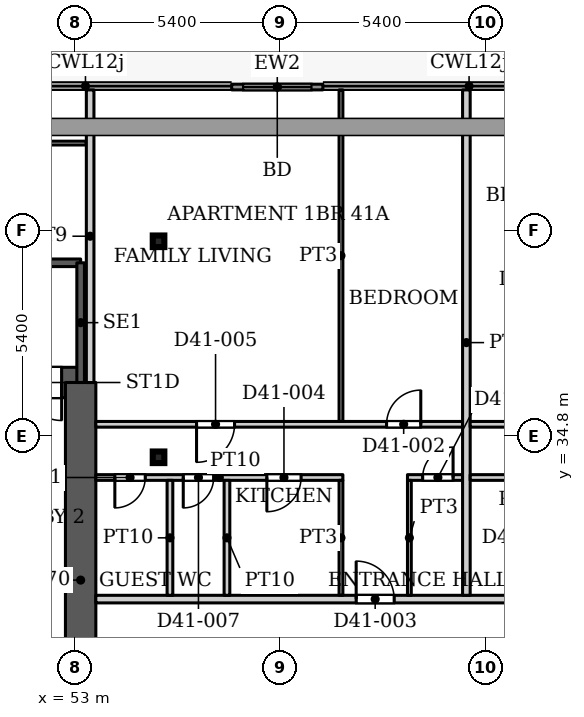
"""IFC4 building model, lengths in metres.
Left out: names, types, materials, properties, quantities, classifications, styles, units other than length and angle.
Written with IfcOpenShell. Run it as: python <this file> out.ifc"""

import sys

from ifc_helpers import new_model, si_unit, direction, frame, frame_2d, origin, origin_2d, place, context, subcontext, project, spatial, rectangle, hollow_rectangle, extrude, source, transform, mapped, element, fill, save


model = new_model("IFC4")
c1 = context("Model", 3, precision=1e-05, world=origin(), true_north=direction((0.0, 1.0)))
c2 = subcontext(c1, "Body", "Model", "MODEL_VIEW")
j1 = project(units=[si_unit("LENGTHUNIT", "METRE"), si_unit("PLANEANGLEUNIT", "RADIAN")], contexts=[c1])
p1 = place(None, origin())
s1 = spatial("IfcSite", under=j1, at=p1, CompositionType="ELEMENT")
p2 = place(p1, origin())
s2 = spatial("IfcBuilding", under=s1, at=p2, CompositionType="ELEMENT")
p3 = place(p2, frame((0.0, 0.0, 176.0)))
s3 = spatial("IfcBuildingStorey", under=s2, at=p3, CompositionType="ELEMENT", Elevation=176.0)
for number, where, z_axis, x_axis in (
    (1, (55.2, 34.232, 0.0), (0.0, 0.0, 1.0), (1.0, 0.0, 0.0)),
    (2, (55.2, 39.916, 0.0), (0.0, 0.0, 1.0), (1.0, 0.0, 0.0)),
):
    element("IfcColumn", number, at=place(p3, frame(where, z_axis=z_axis, x_axis=x_axis)), inside=s3, PredefinedType="COLUMN", context=c2, shape_type="SweptSolid", body=[
        extrude(hollow_rectangle(XDim=0.305, YDim=0.305, WallThickness=0.016, InnerFilletRadius=0.016, OuterFilletRadius=0.032, at=origin_2d()), origin(), (0.0, 0.0, 1.0), 3.9),
    ])
p4 = place(p3, frame((34.75, 36.2, 0.0), z_axis=(0.0, 0.0, 1.0), x_axis=(1.0, 0.0, 0.0)))
e3 = element("IfcWall", 3, at=p4, inside=s3, PredefinedType="SHEAR", context=c2, shape_type="SweptSolid", body=[
    extrude(rectangle(XDim=18.4, YDim=0.8, at=frame_2d((9.2, 0.0))), origin(), (0.0, 0.0, 1.0), 3.9),
])
p5 = place(p4, frame((16.9, 0.0, 0.0)))
e4 = element("IfcOpeningElement", 4, at=p5, cuts=e3, PredefinedType="OPENING", context=c2, shape_type="SweptSolid", body=[
    extrude(rectangle(XDim=1.0, YDim=2.2, at=frame_2d((0.5, 1.1))), frame((0.0, 0.41, 0.0), z_axis=(0.0, -1.0, 0.0), x_axis=(1.0, 0.0, 0.0)), (0.0, 0.0, 1.0), 0.82),
])
p6 = place(p3, frame((53.15, 25.8, 0.0), z_axis=(0.0, 0.0, 1.0), x_axis=(0.0, 1.0, 0.0)))
e5 = element("IfcWall", 5, at=p6, inside=s3, PredefinedType="SHEAR", context=c2, shape_type="SweptSolid", body=[
    extrude(rectangle(XDim=10.4, YDim=0.8, at=frame_2d((5.2, 0.0))), origin(), (0.0, 0.0, 1.0), 3.9),
])
p7 = place(p3, frame((57.124, 43.975, 0.0), z_axis=(0.0, 0.0, 1.0), x_axis=(1.0, 0.0, 0.0)))
e6 = element("IfcWall", 6, at=p7, inside=s3, PredefinedType="SOLIDWALL", context=c2, shape_type="SweptSolid", body=[
    extrude(rectangle(XDim=2.4, YDim=0.15, at=frame_2d((1.2, 0.0))), origin(), (0.0, 0.0, 1.0), 3.75),
])
p8 = place(p7, frame((0.3, 0.0, 0.0)))
e7 = element("IfcOpeningElement", 7, at=p8, cuts=e6, PredefinedType="OPENING", context=c2, shape_type="SweptSolid", body=[
    extrude(rectangle(XDim=1.8, YDim=2.4, at=frame_2d((0.9, 1.2))), frame((0.0, 0.085, 0.0), z_axis=(0.0, -1.0, 0.0), x_axis=(1.0, 0.0, 0.0)), (0.0, 0.0, 1.0), 0.17),
])
p9 = place(p3, frame((43.99, 39.35, 0.0), z_axis=(0.0, 0.0, 1.0), x_axis=(1.0, 0.0, 0.0)))
e8 = element("IfcWall", 8, at=p9, inside=s3, PredefinedType="SHEAR", context=c2, shape_type="SweptSolid", body=[
    extrude(rectangle(XDim=9.16, YDim=0.2, at=frame_2d((4.58, 0.0))), origin(), (0.0, 0.0, 1.0), 3.9),
])
p10 = place(p3, frame((53.15, 36.2, 0.0), z_axis=(0.0, 0.0, 1.0), x_axis=(0.0, 1.0, 0.0)))
e9 = element("IfcWall", 9, at=p10, inside=s3, PredefinedType="SHEAR", context=c2, shape_type="SweptSolid", body=[
    extrude(rectangle(XDim=3.15, YDim=0.2, at=frame_2d((1.575, 0.0))), origin(), (0.0, 0.0, 1.0), 3.9),
])
p11 = place(p3, frame((38.399, 42.5, 0.0), z_axis=(0.0, 0.0, 1.0), x_axis=(1.0, 0.0, 0.0)))
e10 = element("IfcWall", 10, at=p11, inside=s3, PredefinedType="PARTITIONING", context=c2, shape_type="SweptSolid", body=[
    extrude(rectangle(XDim=14.901, YDim=0.1, at=frame_2d((7.451, 0.0))), origin(), (0.0, 0.0, 1.0), 3.6),
])
p12 = place(p11, frame((6.801, 0.0, 0.0)))
e11 = element("IfcOpeningElement", 11, at=p12, cuts=e10, PredefinedType="OPENING", context=c2, shape_type="SweptSolid", body=[
    extrude(rectangle(XDim=1.0, YDim=2.1, at=frame_2d((0.5, 1.05))), frame((0.0, 0.06, 0.0), z_axis=(0.0, -1.0, 0.0), x_axis=(1.0, 0.0, 0.0)), (0.0, 0.0, 1.0), 0.12),
])
p13 = place(p3, frame((53.4, 36.199, 0.0), z_axis=(0.0, 0.0, 1.0), x_axis=(0.0, 1.0, 0.0)))
e12 = element("IfcWall", 12, at=p13, inside=s3, PredefinedType="PARTITIONING", context=c2, shape_type="SweptSolid", body=[
    extrude(rectangle(XDim=7.701, YDim=0.2, at=frame_2d((3.851, 0.0))), origin(), (0.0, 0.0, 1.0), 3.6),
])
p14 = place(p3, frame((53.549, 30.5, 0.0), z_axis=(0.0, 0.0, 1.0), x_axis=(1.0, 0.0, 0.0)))
e13 = element("IfcWall", 13, at=p14, inside=s3, PredefinedType="PARTITIONING", context=c2, shape_type="SweptSolid", body=[
    extrude(rectangle(XDim=44.551, YDim=0.2, at=frame_2d((22.275, 0.0))), origin(), (0.0, 0.0, 1.0), 3.6),
])
p15 = place(p14, frame((6.851, 0.0, 0.0)))
e14 = element("IfcOpeningElement", 14, at=p15, cuts=e13, PredefinedType="OPENING", context=c2, shape_type="SweptSolid", body=[
    extrude(rectangle(XDim=1.0, YDim=2.1, at=frame_2d((0.5, 1.05))), frame((0.0, 0.11, 0.0), z_axis=(0.0, -1.0, 0.0), x_axis=(1.0, 0.0, 0.0)), (0.0, 0.0, 1.0), 0.22),
])
p16 = place(p14, frame((13.451, 0.0, 0.0)))
e15 = element("IfcOpeningElement", 15, at=p16, cuts=e13, PredefinedType="OPENING", context=c2, shape_type="SweptSolid", body=[
    extrude(rectangle(XDim=1.0, YDim=2.1, at=frame_2d((0.5, 1.05))), frame((0.0, 0.11, 0.0), z_axis=(0.0, -1.0, 0.0), x_axis=(1.0, 0.0, 0.0)), (0.0, 0.0, 1.0), 0.22),
])
p17 = place(p14, frame((24.701, 0.0, 0.0)))
e16 = element("IfcOpeningElement", 16, at=p17, cuts=e13, PredefinedType="OPENING", context=c2, shape_type="SweptSolid", body=[
    extrude(rectangle(XDim=1.0, YDim=2.1, at=frame_2d((0.5, 1.05))), frame((0.0, 0.11, 0.0), z_axis=(0.0, -1.0, 0.0), x_axis=(1.0, 0.0, 0.0)), (0.0, 0.0, 1.0), 0.22),
])
p18 = place(p14, frame((38.651, 0.0, 0.0)))
e17 = element("IfcOpeningElement", 17, at=p18, cuts=e13, PredefinedType="OPENING", context=c2, shape_type="SweptSolid", body=[
    extrude(rectangle(XDim=1.0, YDim=2.1, at=frame_2d((0.5, 1.05))), frame((0.0, 0.11, 0.0), z_axis=(0.0, -1.0, 0.0), x_axis=(1.0, 0.0, 0.0)), (0.0, 0.0, 1.0), 0.22),
])
p19 = place(p3, frame((53.549, 33.7, 0.0), z_axis=(0.0, 0.0, 1.0), x_axis=(1.0, 0.0, 0.0)))
e18 = element("IfcWall", 18, at=p19, inside=s3, PredefinedType="PARTITIONING", context=c2, shape_type="SweptSolid", body=[
    extrude(rectangle(XDim=6.501, YDim=0.15, at=frame_2d((3.25, 0.0))), origin(), (0.0, 0.0, 1.0), 3.6),
])
p20 = place(p19, frame((0.501, 0.0, 0.0)))
e19 = element("IfcOpeningElement", 19, at=p20, cuts=e18, PredefinedType="OPENING", context=c2, shape_type="SweptSolid", body=[
    extrude(rectangle(XDim=0.8, YDim=2.1, at=frame_2d((0.4, 1.05))), frame((0.0, 0.085, 0.0), z_axis=(0.0, -1.0, 0.0), x_axis=(1.0, 0.0, 0.0)), (0.0, 0.0, 1.0), 0.17),
])
p21 = place(p19, frame((4.501, 0.0, 0.0)))
e20 = element("IfcOpeningElement", 20, at=p21, cuts=e18, PredefinedType="OPENING", context=c2, shape_type="SweptSolid", body=[
    extrude(rectangle(XDim=0.9, YDim=2.1, at=frame_2d((0.45, 1.05))), frame((0.0, 0.085, 0.0), z_axis=(0.0, -1.0, 0.0), x_axis=(1.0, 0.0, 0.0)), (0.0, 0.0, 1.0), 0.17),
])
p22 = place(p19, frame((2.301, 0.0, 0.0)))
e21 = element("IfcOpeningElement", 21, at=p22, cuts=e18, PredefinedType="OPENING", context=c2, shape_type="SweptSolid", body=[
    extrude(rectangle(XDim=0.8, YDim=2.1, at=frame_2d((0.4, 1.05))), frame((0.0, 0.085, 0.0), z_axis=(0.0, -1.0, 0.0), x_axis=(1.0, 0.0, 0.0)), (0.0, 0.0, 1.0), 0.17),
])
p23 = place(p3, frame((53.549, 35.1, 0.0), z_axis=(0.0, 0.0, 1.0), x_axis=(1.0, 0.0, 0.0)))
e22 = element("IfcWall", 22, at=p23, inside=s3, PredefinedType="PARTITIONING", context=c2, shape_type="SweptSolid", body=[
    extrude(rectangle(XDim=9.651, YDim=0.15, at=frame_2d((4.825, 0.0))), origin(), (0.0, 0.0, 1.0), 3.6),
])
p24 = place(p23, frame((7.651, 0.0, 0.0)))
e23 = element("IfcOpeningElement", 23, at=p24, cuts=e22, PredefinedType="OPENING", context=c2, shape_type="SweptSolid", body=[
    extrude(rectangle(XDim=0.9, YDim=2.1, at=frame_2d((0.45, 1.05))), frame((0.0, 0.085, 0.0), z_axis=(0.0, -1.0, 0.0), x_axis=(1.0, 0.0, 0.0)), (0.0, 0.0, 1.0), 0.17),
])
p25 = place(p23, frame((2.651, 0.0, 0.0)))
e24 = element("IfcOpeningElement", 24, at=p25, cuts=e22, PredefinedType="OPENING", context=c2, shape_type="SweptSolid", body=[
    extrude(rectangle(XDim=1.0, YDim=2.1, at=frame_2d((0.5, 1.05))), frame((0.0, 0.085, 0.0), z_axis=(0.0, -1.0, 0.0), x_axis=(1.0, 0.0, 0.0)), (0.0, 0.0, 1.0), 0.17),
])
for number, where, z_axis, x_axis in (
    (25, (55.5, 30.6, 0.0), (0.0, 0.0, 1.0), (0.0, 1.0, 0.0)),
    (26, (57.0, 30.6, 0.0), (0.0, 0.0, 1.0), (0.0, 1.0, 0.0)),
):
    element("IfcWall", number, at=place(p3, frame(where, z_axis=z_axis, x_axis=x_axis)), inside=s3, PredefinedType="PARTITIONING", context=c2, shape_type="SweptSolid", body=[
        extrude(rectangle(XDim=3.025, YDim=0.15, at=frame_2d((1.512, 0.0))), origin(), (0.0, 0.0, 1.0), 3.6),
    ])
p26 = place(p3, frame((60.0, 30.6, 0.0), z_axis=(0.0, 0.0, 1.0), x_axis=(0.0, 1.0, 0.0)))
e27 = element("IfcWall", 27, at=p26, inside=s3, PredefinedType="PARTITIONING", context=c2, shape_type="SweptSolid", body=[
    extrude(rectangle(XDim=3.025, YDim=0.1, at=frame_2d((1.512, 0.0))), origin(), (0.0, 0.0, 1.0), 3.6),
])
p27 = place(p3, frame((60.0, 35.175, 0.0), z_axis=(0.0, 0.0, 1.0), x_axis=(0.0, 1.0, 0.0)))
e28 = element("IfcWall", 28, at=p27, inside=s3, PredefinedType="PARTITIONING", context=c2, shape_type="SweptSolid", body=[
    extrude(rectangle(XDim=8.725, YDim=0.1, at=frame_2d((4.362, 0.0))), origin(), (0.0, 0.0, 1.0), 3.6),
])
p28 = place(p3, frame((61.75, 33.7, 0.0), z_axis=(0.0, 0.0, 1.0), x_axis=(1.0, 0.0, 0.0)))
e29 = element("IfcWall", 29, at=p28, inside=s3, PredefinedType="PARTITIONING", context=c2, shape_type="SweptSolid", body=[
    extrude(rectangle(XDim=1.45, YDim=0.15, at=frame_2d((0.725, 0.0))), origin(), (0.0, 0.0, 1.0), 3.6),
])
p29 = place(p28, frame((0.4, 0.0, 0.0)))
e30 = element("IfcOpeningElement", 30, at=p29, cuts=e29, PredefinedType="OPENING", context=c2, shape_type="SweptSolid", body=[
    extrude(rectangle(XDim=0.8, YDim=2.1, at=frame_2d((0.4, 1.05))), frame((0.0, 0.085, 0.0), z_axis=(0.0, -1.0, 0.0), x_axis=(1.0, 0.0, 0.0)), (0.0, 0.0, 1.0), 0.17),
])
p30 = place(p3, frame((61.8, 30.6, 0.0), z_axis=(0.0, 0.0, 1.0), x_axis=(0.0, 1.0, 0.0)))
e31 = element("IfcWall", 31, at=p30, inside=s3, PredefinedType="PARTITIONING", context=c2, shape_type="SweptSolid", body=[
    extrude(rectangle(XDim=3.025, YDim=0.1, at=frame_2d((1.512, 0.0))), origin(), (0.0, 0.0, 1.0), 3.6),
])
p31 = place(p3, frame((63.3, 30.6, 0.0), z_axis=(0.0, 0.0, 1.0), x_axis=(0.0, 1.0, 0.0)))
e32 = element("IfcWall", 32, at=p31, inside=s3, PredefinedType="PARTITIONING", context=c2, shape_type="SweptSolid", body=[
    extrude(rectangle(XDim=13.3, YDim=0.2, at=frame_2d((6.65, 0.0))), origin(), (0.0, 0.0, 1.0), 3.6),
])
p32 = place(p3, frame((63.4, 33.7, 0.0), z_axis=(0.0, 0.0, 1.0), x_axis=(1.0, 0.0, 0.0)))
e33 = element("IfcWall", 33, at=p32, inside=s3, PredefinedType="PARTITIONING", context=c2, shape_type="SweptSolid", body=[
    extrude(rectangle(XDim=2.825, YDim=0.15, at=frame_2d((1.413, 0.0))), origin(), (0.0, 0.0, 1.0), 3.6),
])
p33 = place(p32, frame((1.0, 0.0, 0.0)))
e34 = element("IfcOpeningElement", 34, at=p33, cuts=e33, PredefinedType="OPENING", context=c2, shape_type="SweptSolid", body=[
    extrude(rectangle(XDim=0.8, YDim=2.1, at=frame_2d((0.4, 1.05))), frame((0.0, 0.085, 0.0), z_axis=(0.0, -1.0, 0.0), x_axis=(1.0, 0.0, 0.0)), (0.0, 0.0, 1.0), 0.17),
])
p34 = place(p3, frame((63.4, 35.1, 0.0), z_axis=(0.0, 0.0, 1.0), x_axis=(1.0, 0.0, 0.0)))
e35 = element("IfcWall", 35, at=p34, inside=s3, PredefinedType="PARTITIONING", context=c2, shape_type="SweptSolid", body=[
    extrude(rectangle(XDim=14.2, YDim=0.15, at=frame_2d((7.1, 0.0))), origin(), (0.0, 0.0, 1.0), 3.6),
])
p35 = place(p34, frame((1.4, 0.0, 0.0)))
e36 = element("IfcOpeningElement", 36, at=p35, cuts=e35, PredefinedType="OPENING", context=c2, shape_type="SweptSolid", body=[
    extrude(rectangle(XDim=0.9, YDim=2.1, at=frame_2d((0.45, 1.05))), frame((0.0, 0.085, 0.0), z_axis=(0.0, -1.0, 0.0), x_axis=(1.0, 0.0, 0.0)), (0.0, 0.0, 1.0), 0.17),
])
p36 = place(p34, frame((10.95, 0.0, 0.0)))
e37 = element("IfcOpeningElement", 37, at=p36, cuts=e35, PredefinedType="OPENING", context=c2, shape_type="SweptSolid", body=[
    extrude(rectangle(XDim=1.0, YDim=2.1, at=frame_2d((0.5, 1.05))), frame((0.0, 0.085, 0.0), z_axis=(0.0, -1.0, 0.0), x_axis=(1.0, 0.0, 0.0)), (0.0, 0.0, 1.0), 0.17),
])
p37 = place(p34, frame((6.8, 0.0, 0.0)))
e38 = element("IfcOpeningElement", 38, at=p37, cuts=e35, PredefinedType="OPENING", context=c2, shape_type="SweptSolid", body=[
    extrude(rectangle(XDim=0.9, YDim=2.1, at=frame_2d((0.45, 1.05))), frame((0.0, 0.085, 0.0), z_axis=(0.0, -1.0, 0.0), x_axis=(1.0, 0.0, 0.0)), (0.0, 0.0, 1.0), 0.17),
])
m1 = source(origin(), c2, "Body", "SweptSolid", [
    extrude(rectangle(XDim=1.8, YDim=2.4, at=frame_2d((0.9, 1.2))), frame((0.0, 0.025, 0.0), z_axis=(0.0, -1.0, 0.0), x_axis=(1.0, 0.0, 0.0)), (0.0, 0.0, 1.0), 0.05),
])
p38 = place(p8, origin())
e39 = element("IfcDoor", 39, at=p38, inside=s3, OperationType="SLIDING_TO_LEFT", PredefinedType="DOOR", context=c2, shape_type="MappedRepresentation", body=[
    mapped(m1, transform((0.0, 0.0, 0.0), x_axis=(1.0, 0.0, 0.0), y_axis=(0.0, 1.0, 0.0), z_axis=(0.0, 0.0, 1.0), scale=1.0)),
])
fill(e7, e39)
m2 = source(origin(), c2, "Body", "SweptSolid", [
    extrude(rectangle(XDim=1.0, YDim=2.2, at=frame_2d((0.5, 1.1))), frame((0.0, 0.025, 0.0), z_axis=(0.0, -1.0, 0.0), x_axis=(1.0, 0.0, 0.0)), (0.0, 0.0, 1.0), 0.05),
])
p39 = place(p5, origin())
e40 = element("IfcDoor", 40, at=p39, inside=s3, OperationType="SINGLE_SWING_RIGHT", PredefinedType="DOOR", context=c2, shape_type="MappedRepresentation", body=[
    mapped(m2, transform((0.0, 0.0, 0.0), x_axis=(1.0, 0.0, 0.0), y_axis=(0.0, 1.0, 0.0), z_axis=(0.0, 0.0, 1.0), scale=1.0)),
])
fill(e4, e40)
m3 = source(origin(), c2, "Body", "SweptSolid", [
    extrude(rectangle(XDim=0.8, YDim=2.1, at=frame_2d((0.4, 1.05))), frame((0.0, 0.025, 0.0), z_axis=(0.0, -1.0, 0.0), x_axis=(1.0, 0.0, 0.0)), (0.0, 0.0, 1.0), 0.05),
])
p40 = place(p20, origin())
e41 = element("IfcDoor", 41, at=p40, inside=s3, OperationType="SINGLE_SWING_RIGHT", PredefinedType="DOOR", context=c2, shape_type="MappedRepresentation", body=[
    mapped(m3, transform((0.0, 0.0, 0.0), x_axis=(1.0, 0.0, 0.0), y_axis=(0.0, 1.0, 0.0), z_axis=(0.0, 0.0, 1.0), scale=1.0)),
])
fill(e19, e41)
m4 = source(origin(), c2, "Body", "SweptSolid", [
    extrude(rectangle(XDim=0.9, YDim=2.1, at=frame_2d((0.45, 1.05))), frame((0.0, 0.025, 0.0), z_axis=(0.0, -1.0, 0.0), x_axis=(1.0, 0.0, 0.0)), (0.0, 0.0, 1.0), 0.05),
])
p41 = place(p24, origin())
e42 = element("IfcDoor", 42, at=p41, inside=s3, OperationType="SINGLE_SWING_LEFT", PredefinedType="DOOR", context=c2, shape_type="MappedRepresentation", body=[
    mapped(m4, transform((0.0, 0.0, 0.0), x_axis=(1.0, 0.0, 0.0), y_axis=(0.0, 1.0, 0.0), z_axis=(0.0, 0.0, 1.0), scale=1.0)),
])
fill(e23, e42)
m5 = source(origin(), c2, "Body", "SweptSolid", [
    extrude(rectangle(XDim=1.0, YDim=2.1, at=frame_2d((0.5, 1.05))), frame((0.0, 0.025, 0.0), z_axis=(0.0, -1.0, 0.0), x_axis=(1.0, 0.0, 0.0)), (0.0, 0.0, 1.0), 0.05),
])
p42 = place(p15, origin())
e43 = element("IfcDoor", 43, at=p42, inside=s3, OperationType="SINGLE_SWING_LEFT", PredefinedType="DOOR", context=c2, shape_type="MappedRepresentation", body=[
    mapped(m5, transform((0.0, 0.0, 0.0), x_axis=(1.0, 0.0, 0.0), y_axis=(0.0, 1.0, 0.0), z_axis=(0.0, 0.0, 1.0), scale=1.0)),
])
fill(e14, e43)
p43 = place(p21, origin())
e44 = element("IfcDoor", 44, at=p43, inside=s3, OperationType="SINGLE_SWING_RIGHT", PredefinedType="DOOR", context=c2, shape_type="MappedRepresentation", body=[
    mapped(m4, transform((0.0, 0.0, 0.0), x_axis=(1.0, 0.0, 0.0), y_axis=(0.0, 1.0, 0.0), z_axis=(0.0, 0.0, 1.0), scale=1.0)),
])
fill(e20, e44)
m6 = source(origin(), c2, "Body", "SweptSolid", [
    extrude(rectangle(XDim=1.0, YDim=2.1, at=frame_2d((0.5, 1.05))), frame((0.0, 0.025, 0.0), z_axis=(0.0, -1.0, 0.0), x_axis=(1.0, 0.0, 0.0)), (0.0, 0.0, 1.0), 0.05),
])
p44 = place(p25, origin())
e45 = element("IfcDoor", 45, at=p44, inside=s3, OperationType="SINGLE_SWING_RIGHT", PredefinedType="DOOR", context=c2, shape_type="MappedRepresentation", body=[
    mapped(m6, transform((0.0, 0.0, 0.0), x_axis=(1.0, 0.0, 0.0), y_axis=(0.0, 1.0, 0.0), z_axis=(0.0, 0.0, 1.0), scale=1.0)),
])
fill(e24, e45)
p45 = place(p29, origin())
e46 = element("IfcDoor", 46, at=p45, inside=s3, OperationType="SINGLE_SWING_LEFT", PredefinedType="DOOR", context=c2, shape_type="MappedRepresentation", body=[
    mapped(m3, transform((0.0, 0.0, 0.0), x_axis=(1.0, 0.0, 0.0), y_axis=(0.0, 1.0, 0.0), z_axis=(0.0, 0.0, 1.0), scale=1.0)),
])
fill(e30, e46)
p46 = place(p22, origin())
e47 = element("IfcDoor", 47, at=p46, inside=s3, OperationType="SINGLE_SWING_RIGHT", PredefinedType="DOOR", context=c2, shape_type="MappedRepresentation", body=[
    mapped(m3, transform((0.0, 0.0, 0.0), x_axis=(1.0, 0.0, 0.0), y_axis=(0.0, 1.0, 0.0), z_axis=(0.0, 0.0, 1.0), scale=1.0)),
])
fill(e21, e47)
save(model, sys.argv[1])
